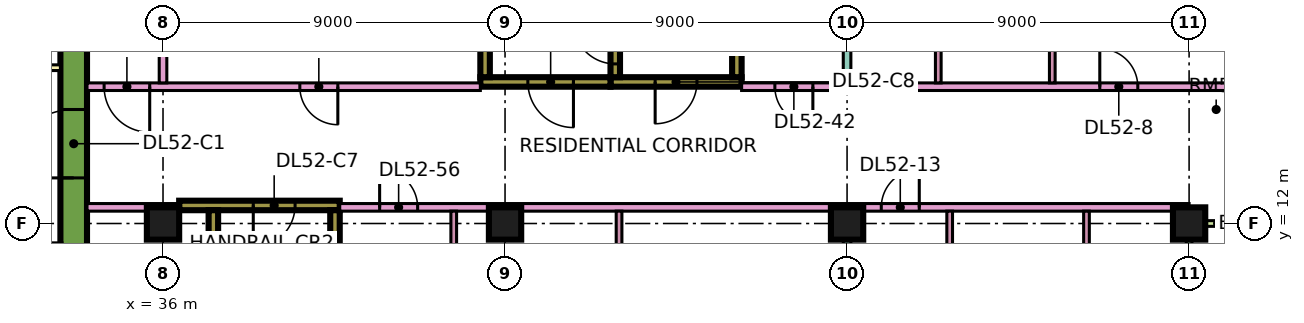
"""IFC4 building model, lengths in metres.
Left out: names, types, materials, properties, quantities, classifications, styles, units other than length and angle.
Written with IfcOpenShell. Run it as: python <this file> out.ifc"""

import sys

from ifc_helpers import new_model, si_unit, direction, frame, frame_2d, origin, origin_2d, place, context, subcontext, project, spatial, rectangle, extrude, element, fill, save


model = new_model("IFC4")
c1 = context("Model", 3, precision=1e-05, world=origin(), true_north=direction((0.0, 1.0)))
c2 = subcontext(c1, "Body", "Model", "MODEL_VIEW")
j1 = project(units=[si_unit("LENGTHUNIT", "METRE"), si_unit("PLANEANGLEUNIT", "RADIAN")], contexts=[c1])
p1 = place(None, origin())
s1 = spatial("IfcSite", under=j1, at=p1, CompositionType="ELEMENT")
p2 = place(p1, origin())
s2 = spatial("IfcBuilding", under=s1, at=p2, CompositionType="ELEMENT")
p3 = place(p2, frame((0.0, 0.0, 222.9)))
s3 = spatial("IfcBuildingStorey", under=s2, at=p3, CompositionType="ELEMENT", Elevation=222.9)
for number, where, z_axis, x_axis in (
    (1, (36.0, 12.0, 0.0), (0.0, 0.0, 1.0), (1.0, 0.0, 0.0)),
    (2, (45.0, 12.0, 0.0), (0.0, 0.0, 1.0), (1.0, 0.0, 0.0)),
    (3, (54.0, 12.0, 0.0), (0.0, 0.0, 1.0), (1.0, 0.0, 0.0)),
    (4, (63.0, 12.0, 0.0), (0.0, 0.0, 1.0), (1.0, 0.0, 0.0)),
):
    element("IfcColumn", number, at=place(p3, frame(where, z_axis=z_axis, x_axis=x_axis)), inside=s3, PredefinedType="COLUMN", context=c2, shape_type="SweptSolid", body=[
        extrude(rectangle(XDim=0.85, YDim=0.85, at=origin_2d()), origin(), (0.0, 0.0, 1.0), 3.75),
    ])
p4 = place(p3, frame((33.65, 7.7, 0.0), z_axis=(0.0, 0.0, 1.0), x_axis=(0.0, 1.0, 0.0)))
e5 = element("IfcWall", 5, at=p4, inside=s3, PredefinedType="SHEAR", context=c2, shape_type="SweptSolid", body=[
    extrude(rectangle(XDim=11.6, YDim=0.7, at=frame_2d((5.8, 0.0))), origin(), (0.0, 0.0, 1.0), 3.75),
])
p5 = place(p4, frame((5.5, 0.0, 0.0)))
e6 = element("IfcOpeningElement", 6, at=p5, cuts=e5, PredefinedType="OPENING", context=c2, shape_type="SweptSolid", body=[
    extrude(rectangle(XDim=1.8, YDim=2.4, at=frame_2d((0.9, 1.2))), frame((0.0, 0.36, 0.0), z_axis=(0.0, -1.0, 0.0), x_axis=(1.0, 0.0, 0.0)), (0.0, 0.0, 1.0), 0.72),
])
p6 = place(p3, frame((36.425, 12.475, 0.0), z_axis=(0.0, 0.0, 1.0), x_axis=(1.0, 0.0, 0.0)))
e7 = element("IfcWall", 7, at=p6, inside=s3, PredefinedType="SHEAR", context=c2, shape_type="SweptSolid", body=[
    extrude(rectangle(XDim=4.225, YDim=0.25, at=frame_2d((2.112, 0.0))), origin(), (0.0, 0.0, 1.0), 3.75),
])
p7 = place(p6, frame((1.95, 0.0, 0.0)))
e8 = element("IfcOpeningElement", 8, at=p7, cuts=e7, PredefinedType="OPENING", context=c2, shape_type="SweptSolid", body=[
    extrude(rectangle(XDim=1.1, YDim=2.2, at=frame_2d((0.55, 1.1))), frame((0.0, 0.135, 0.0), z_axis=(0.0, -1.0, 0.0), x_axis=(1.0, 0.0, 0.0)), (0.0, 0.0, 1.0), 0.27),
])
for number, where, z_axis, x_axis in (
    (9, (37.325, 5.85, 0.0), (0.0, 0.0, 1.0), (0.0, 1.0, 0.0)),
    (10, (40.525, 5.85, 0.0), (0.0, 0.0, 1.0), (0.0, 1.0, 0.0)),
):
    element("IfcWall", number, at=place(p3, frame(where, z_axis=z_axis, x_axis=x_axis)), inside=s3, PredefinedType="SHEAR", context=c2, shape_type="SweptSolid", body=[
        extrude(rectangle(XDim=6.5, YDim=0.25, at=frame_2d((3.25, 0.0))), origin(), (0.0, 0.0, 1.0), 3.75),
    ])
p8 = place(p3, frame((47.775, 15.725, 0.0), z_axis=(0.0, 0.0, 1.0), x_axis=(1.0, 0.0, 0.0)))
e11 = element("IfcWall", 11, at=p8, inside=s3, PredefinedType="SHEAR", context=c2, shape_type="SweptSolid", body=[
    extrude(rectangle(XDim=3.45, YDim=0.25, at=frame_2d((1.725, 0.0))), origin(), (0.0, 0.0, 1.0), 3.75),
])
p9 = place(p8, frame((1.175, 0.0, 0.0)))
e12 = element("IfcOpeningElement", 12, at=p9, cuts=e11, PredefinedType="OPENING", context=c2, shape_type="SweptSolid", body=[
    extrude(rectangle(XDim=1.1, YDim=2.2, at=frame_2d((0.55, 1.1))), frame((0.0, 0.135, 0.0), z_axis=(0.0, -1.0, 0.0), x_axis=(1.0, 0.0, 0.0)), (0.0, 0.0, 1.0), 0.27),
])
p10 = place(p3, frame((47.9, 15.85, 0.0), z_axis=(0.0, 0.0, 1.0), x_axis=(0.0, 1.0, 0.0)))
e13 = element("IfcWall", 13, at=p10, inside=s3, PredefinedType="SHEAR", context=c2, shape_type="SweptSolid", body=[
    extrude(rectangle(XDim=6.5, YDim=0.25, at=frame_2d((3.25, 0.0))), origin(), (0.0, 0.0, 1.0), 3.75),
])
p11 = place(p10, frame((0.35, 0.0, 0.0)))
e14 = element("IfcOpeningElement", 14, at=p11, cuts=e13, PredefinedType="OPENING", context=c2, shape_type="SweptSolid", body=[
    extrude(rectangle(XDim=1.1, YDim=2.2, at=frame_2d((0.55, 1.1))), frame((0.0, 0.135, 0.0), z_axis=(0.0, -1.0, 0.0), x_axis=(1.0, 0.0, 0.0)), (0.0, 0.0, 1.0), 0.27),
])
p12 = place(p3, frame((51.1, 15.85, 0.0), z_axis=(0.0, 0.0, 1.0), x_axis=(0.0, 1.0, 0.0)))
e15 = element("IfcWall", 15, at=p12, inside=s3, PredefinedType="SHEAR", context=c2, shape_type="SweptSolid", body=[
    extrude(rectangle(XDim=6.5, YDim=0.25, at=frame_2d((3.25, 0.0))), origin(), (0.0, 0.0, 1.0), 3.75),
])
p13 = place(p3, frame((44.35, 15.725, 0.0), z_axis=(0.0, 0.0, 1.0), x_axis=(1.0, 0.0, 0.0)))
e16 = element("IfcWall", 16, at=p13, inside=s3, PredefinedType="SHEAR", context=c2, shape_type="SweptSolid", body=[
    extrude(rectangle(XDim=3.425, YDim=0.25, at=frame_2d((1.712, 0.0))), origin(), (0.0, 0.0, 1.0), 3.75),
])
p14 = place(p13, frame((1.25, 0.0, 0.0)))
e17 = element("IfcOpeningElement", 17, at=p14, cuts=e16, PredefinedType="OPENING", context=c2, shape_type="SweptSolid", body=[
    extrude(rectangle(XDim=1.2, YDim=2.2, at=frame_2d((0.6, 1.1))), frame((0.0, 0.135, 0.0), z_axis=(0.0, -1.0, 0.0), x_axis=(1.0, 0.0, 0.0)), (0.0, 0.0, 1.0), 0.27),
])
p15 = place(p3, frame((44.475, 15.85, 0.0), z_axis=(0.0, 0.0, 1.0), x_axis=(0.0, 1.0, 0.0)))
e18 = element("IfcWall", 18, at=p15, inside=s3, PredefinedType="SHEAR", context=c2, shape_type="SweptSolid", body=[
    extrude(rectangle(XDim=6.5, YDim=0.25, at=frame_2d((3.25, 0.0))), origin(), (0.0, 0.0, 1.0), 3.75),
])
p16 = place(p15, frame((1.75, 0.0, 0.0)))
e19 = element("IfcOpeningElement", 19, at=p16, cuts=e18, PredefinedType="OPENING", context=c2, shape_type="SweptSolid", body=[
    extrude(rectangle(XDim=1.1, YDim=2.2, at=frame_2d((0.55, 1.1))), frame((0.0, 0.135, 0.0), z_axis=(0.0, -1.0, 0.0), x_axis=(1.0, 0.0, 0.0)), (0.0, 0.0, 1.0), 0.27),
])
p17 = place(p15, frame((4.3, 0.0, 0.0)))
e20 = element("IfcOpeningElement", 20, at=p17, cuts=e18, PredefinedType="OPENING", context=c2, shape_type="SweptSolid", body=[
    extrude(rectangle(XDim=1.1, YDim=2.2, at=frame_2d((0.55, 1.1))), frame((0.0, 0.135, 0.0), z_axis=(0.0, -1.0, 0.0), x_axis=(1.0, 0.0, 0.0)), (0.0, 0.0, 1.0), 0.27),
])
p18 = place(p3, frame((63.0, 1.575, 0.0), z_axis=(0.0, 0.0, 1.0), x_axis=(0.0, 1.0, 0.0)))
e21 = element("IfcWall", 21, at=p18, inside=s3, PredefinedType="SOLIDWALL", context=c2, shape_type="SweptSolid", body=[
    extrude(rectangle(XDim=10.35, YDim=0.15, at=frame_2d((5.175, 0.0))), origin(), (0.0, 0.0, 1.0), 3.35),
])
p19 = place(p18, frame((1.825, 0.0, 0.0)))
e22 = element("IfcOpeningElement", 22, at=p19, cuts=e21, PredefinedType="OPENING", context=c2, shape_type="SweptSolid", body=[
    extrude(rectangle(XDim=1.8, YDim=2.4, at=frame_2d((0.9, 1.2))), frame((0.0, 0.085, 0.0), z_axis=(0.0, -1.0, 0.0), x_axis=(1.0, 0.0, 0.0)), (0.0, 0.0, 1.0), 0.17),
])
p20 = place(p18, frame((7.075, 0.0, 0.45)))
e23 = element("IfcOpeningElement", 23, at=p20, cuts=e21, PredefinedType="OPENING", context=c2, shape_type="SweptSolid", body=[
    extrude(rectangle(XDim=2.4, YDim=2.4, at=frame_2d((1.2, 1.2))), frame((0.0, 0.085, 0.0), z_axis=(0.0, -1.0, 0.0), x_axis=(1.0, 0.0, 0.0)), (0.0, 0.0, 1.0), 0.17),
])
p21 = place(p3, frame((64.5, 12.0, 0.0), z_axis=(0.0, 0.0, 1.0), x_axis=(-1.0, 0.0, 0.0)))
e24 = element("IfcWall", 24, at=p21, inside=s3, PredefinedType="SOLIDWALL", context=c2, shape_type="SweptSolid", body=[
    extrude(rectangle(XDim=1.5, YDim=0.15, at=frame_2d((0.75, 0.0))), origin(), (0.0, 0.0, 1.0), 3.35),
])
p22 = place(p3, frame((31.3, 16.1, 0.0), z_axis=(0.0, 0.0, 1.0), x_axis=(1.0, 0.0, 0.0)))
e25 = element("IfcWall", 25, at=p22, inside=s3, PredefinedType="PARTITIONING", context=c2, shape_type="SweptSolid", body=[
    extrude(rectangle(XDim=2.0, YDim=0.15, at=frame_2d((1.0, 0.0))), origin(), (0.0, 0.0, 1.0), 3.35),
])
p23 = place(p3, frame((34.0, 12.425, 0.0), z_axis=(0.0, 0.0, 1.0), x_axis=(1.0, 0.0, 0.0)))
e26 = element("IfcWall", 26, at=p23, inside=s3, PredefinedType="PARTITIONING", context=c2, shape_type="SweptSolid", body=[
    extrude(rectangle(XDim=2.426, YDim=0.2, at=frame_2d((1.213, 0.0))), origin(), (0.0, 0.0, 1.0), 3.35),
])
p24 = place(p3, frame((34.0, 15.6, 0.0), z_axis=(0.0, 0.0, 1.0), x_axis=(1.0, 0.0, 0.0)))
e27 = element("IfcWall", 27, at=p24, inside=s3, PredefinedType="PARTITIONING", context=c2, shape_type="SweptSolid", body=[
    extrude(rectangle(XDim=10.35, YDim=0.2, at=frame_2d((5.175, 0.0))), origin(), (0.0, 0.0, 1.0), 3.35),
])
p25 = place(p24, frame((5.6, 0.0, 0.0)))
e28 = element("IfcOpeningElement", 28, at=p25, cuts=e27, PredefinedType="OPENING", context=c2, shape_type="SweptSolid", body=[
    extrude(rectangle(XDim=1.0, YDim=2.1, at=frame_2d((0.5, 1.05))), frame((0.0, 0.11, 0.0), z_axis=(0.0, -1.0, 0.0), x_axis=(1.0, 0.0, 0.0)), (0.0, 0.0, 1.0), 0.22),
])
p26 = place(p24, frame((0.45, 0.0, 0.0)))
e29 = element("IfcOpeningElement", 29, at=p26, cuts=e27, PredefinedType="OPENING", context=c2, shape_type="SweptSolid", body=[
    extrude(rectangle(XDim=1.2, YDim=2.1, at=frame_2d((0.6, 1.05))), frame((0.0, 0.11, 0.0), z_axis=(0.0, -1.0, 0.0), x_axis=(1.0, 0.0, 0.0)), (0.0, 0.0, 1.0), 0.22),
])
p27 = place(p3, frame((36.0, 15.7, 0.0), z_axis=(0.0, 0.0, 1.0), x_axis=(0.0, 1.0, 0.0)))
e30 = element("IfcWall", 30, at=p27, inside=s3, PredefinedType="PARTITIONING", context=c2, shape_type="SweptSolid", body=[
    extrude(rectangle(XDim=8.3, YDim=0.2, at=frame_2d((4.15, 0.0))), origin(), (0.0, 0.0, 1.0), 3.35),
])
p28 = place(p3, frame((40.65, 12.425, 0.0), z_axis=(0.0, 0.0, 1.0), x_axis=(1.0, 0.0, 0.0)))
e31 = element("IfcWall", 31, at=p28, inside=s3, PredefinedType="PARTITIONING", context=c2, shape_type="SweptSolid", body=[
    extrude(rectangle(XDim=22.35, YDim=0.2, at=frame_2d((11.175, 0.0))), origin(), (0.0, 0.0, 1.0), 3.35),
])
p29 = place(p28, frame((14.25, 0.0, 0.0)))
e32 = element("IfcOpeningElement", 32, at=p29, cuts=e31, PredefinedType="OPENING", context=c2, shape_type="SweptSolid", body=[
    extrude(rectangle(XDim=1.0, YDim=2.1, at=frame_2d((0.5, 1.05))), frame((0.0, 0.11, 0.0), z_axis=(0.0, -1.0, 0.0), x_axis=(1.0, 0.0, 0.0)), (0.0, 0.0, 1.0), 0.22),
])
p30 = place(p28, frame((1.05, 0.0, 0.0)))
e33 = element("IfcOpeningElement", 33, at=p30, cuts=e31, PredefinedType="OPENING", context=c2, shape_type="SweptSolid", body=[
    extrude(rectangle(XDim=1.0, YDim=2.1, at=frame_2d((0.5, 1.05))), frame((0.0, 0.11, 0.0), z_axis=(0.0, -1.0, 0.0), x_axis=(1.0, 0.0, 0.0)), (0.0, 0.0, 1.0), 0.22),
])
p31 = place(p3, frame((43.65, 5.975, 0.0), z_axis=(0.0, 0.0, 1.0), x_axis=(0.0, 1.0, 0.0)))
e34 = element("IfcWall", 34, at=p31, inside=s3, PredefinedType="PARTITIONING", context=c2, shape_type="SweptSolid", body=[
    extrude(rectangle(XDim=6.35, YDim=0.15, at=frame_2d((3.175, 0.0))), origin(), (0.0, 0.0, 1.0), 3.35),
])
p32 = place(p31, frame((4.275, 0.0, 0.0)))
e35 = element("IfcOpeningElement", 35, at=p32, cuts=e34, PredefinedType="OPENING", context=c2, shape_type="SweptSolid", body=[
    extrude(rectangle(XDim=0.9, YDim=2.1, at=frame_2d((0.45, 1.05))), frame((0.0, 0.085, 0.0), z_axis=(0.0, -1.0, 0.0), x_axis=(1.0, 0.0, 0.0)), (0.0, 0.0, 1.0), 0.17),
])
p33 = place(p3, frame((48.0, 5.975, 0.0), z_axis=(0.0, 0.0, 1.0), x_axis=(0.0, 1.0, 0.0)))
e36 = element("IfcWall", 36, at=p33, inside=s3, PredefinedType="PARTITIONING", context=c2, shape_type="SweptSolid", body=[
    extrude(rectangle(XDim=6.35, YDim=0.15, at=frame_2d((3.175, 0.0))), origin(), (0.0, 0.0, 1.0), 3.35),
])
p34 = place(p3, frame((51.225, 15.6, 0.0), z_axis=(0.0, 0.0, 1.0), x_axis=(1.0, 0.0, 0.0)))
e37 = element("IfcWall", 37, at=p34, inside=s3, PredefinedType="PARTITIONING", context=c2, shape_type="SweptSolid", body=[
    extrude(rectangle(XDim=13.125, YDim=0.2, at=frame_2d((6.562, 0.0))), origin(), (0.0, 0.0, 1.0), 3.35),
])
p35 = place(p34, frame((9.425, 0.0, 0.0)))
e38 = element("IfcOpeningElement", 38, at=p35, cuts=e37, PredefinedType="OPENING", context=c2, shape_type="SweptSolid", body=[
    extrude(rectangle(XDim=1.0, YDim=2.1, at=frame_2d((0.5, 1.05))), frame((0.0, 0.11, 0.0), z_axis=(0.0, -1.0, 0.0), x_axis=(1.0, 0.0, 0.0)), (0.0, 0.0, 1.0), 0.22),
])
p36 = place(p34, frame((0.875, 0.0, 0.0)))
e39 = element("IfcOpeningElement", 39, at=p36, cuts=e37, PredefinedType="OPENING", context=c2, shape_type="SweptSolid", body=[
    extrude(rectangle(XDim=1.0, YDim=2.1, at=frame_2d((0.5, 1.05))), frame((0.0, 0.11, 0.0), z_axis=(0.0, -1.0, 0.0), x_axis=(1.0, 0.0, 0.0)), (0.0, 0.0, 1.0), 0.22),
])
p37 = place(p3, frame((54.0, 0.074, 0.0), z_axis=(0.0, 0.0, 1.0), x_axis=(0.0, 1.0, 0.0)))
e40 = element("IfcWall", 40, at=p37, inside=s3, PredefinedType="PARTITIONING", context=c2, shape_type="SweptSolid", body=[
    extrude(rectangle(XDim=12.251, YDim=0.2, at=frame_2d((6.125, 0.0))), origin(), (0.0, 0.0, 1.0), 3.35),
])
p38 = place(p3, frame((54.0, 15.7, 0.0), z_axis=(0.0, 0.0, 1.0), x_axis=(0.0, 1.0, 0.0)))
e41 = element("IfcWall", 41, at=p38, inside=s3, PredefinedType="PARTITIONING", context=c2, shape_type="SweptSolid", body=[
    extrude(rectangle(XDim=8.226, YDim=0.2, at=frame_2d((4.113, 0.0))), origin(), (0.0, 0.0, 1.0), 3.35),
])
p39 = place(p3, frame((56.4, 15.7, 0.0), z_axis=(0.0, 0.0, 1.0), x_axis=(0.0, 1.0, 0.0)))
e42 = element("IfcWall", 42, at=p39, inside=s3, PredefinedType="PARTITIONING", context=c2, shape_type="SweptSolid", body=[
    extrude(rectangle(XDim=3.125, YDim=0.15, at=frame_2d((1.562, 0.0))), origin(), (0.0, 0.0, 1.0), 3.35),
])
p40 = place(p3, frame((56.7, 8.3, 0.0), z_axis=(0.0, 0.0, 1.0), x_axis=(0.0, 1.0, 0.0)))
e43 = element("IfcWall", 43, at=p40, inside=s3, PredefinedType="PARTITIONING", context=c2, shape_type="SweptSolid", body=[
    extrude(rectangle(XDim=4.025, YDim=0.15, at=frame_2d((2.012, 0.0))), origin(), (0.0, 0.0, 1.0), 3.35),
])
p41 = place(p3, frame((59.4, 15.7, 0.0), z_axis=(0.0, 0.0, 1.0), x_axis=(0.0, 1.0, 0.0)))
e44 = element("IfcWall", 44, at=p41, inside=s3, PredefinedType="PARTITIONING", context=c2, shape_type="SweptSolid", body=[
    extrude(rectangle(XDim=3.125, YDim=0.15, at=frame_2d((1.562, 0.0))), origin(), (0.0, 0.0, 1.0), 3.35),
])
p42 = place(p41, frame((1.2, 0.0, 0.0)))
e45 = element("IfcOpeningElement", 45, at=p42, cuts=e44, PredefinedType="OPENING", context=c2, shape_type="SweptSolid", body=[
    extrude(rectangle(XDim=0.8, YDim=2.1, at=frame_2d((0.4, 1.05))), frame((0.0, 0.085, 0.0), z_axis=(0.0, -1.0, 0.0), x_axis=(1.0, 0.0, 0.0)), (0.0, 0.0, 1.0), 0.17),
])
p43 = place(p3, frame((60.3, 8.3, 0.0), z_axis=(0.0, 0.0, 1.0), x_axis=(0.0, 1.0, 0.0)))
e46 = element("IfcWall", 46, at=p43, inside=s3, PredefinedType="PARTITIONING", context=c2, shape_type="SweptSolid", body=[
    extrude(rectangle(XDim=4.025, YDim=0.15, at=frame_2d((2.012, 0.0))), origin(), (0.0, 0.0, 1.0), 3.35),
])
p44 = place(p5, origin())
e47 = element("IfcDoor", 47, at=p44, inside=s3, OperationType="DOUBLE_DOOR_SINGLE_SWING", PredefinedType="DOOR", context=c2, shape_type="SweptSolid", body=[
    extrude(rectangle(XDim=1.8, YDim=2.4, at=frame_2d((0.9, 1.2))), frame((0.0, 0.025, 0.0), z_axis=(0.0, -1.0, 0.0), x_axis=(1.0, 0.0, 0.0)), (0.0, 0.0, 1.0), 0.05),
])
fill(e6, e47)
p45 = place(p7, frame((1.1, 0.0, 0.0), z_axis=(0.0, 0.0, 1.0), x_axis=(-1.0, 0.0, 0.0)))
e48 = element("IfcDoor", 48, at=p45, inside=s3, OperationType="SINGLE_SWING_LEFT", PredefinedType="DOOR", context=c2, shape_type="SweptSolid", body=[
    extrude(rectangle(XDim=1.1, YDim=2.2, at=frame_2d((0.55, 1.1))), frame((0.0, 0.025, 0.0), z_axis=(0.0, -1.0, 0.0), x_axis=(1.0, 0.0, 0.0)), (0.0, 0.0, 1.0), 0.05),
])
fill(e8, e48)
p46 = place(p9, frame((1.1, 0.0, 0.0), z_axis=(0.0, 0.0, 1.0), x_axis=(-1.0, 0.0, 0.0)))
e49 = element("IfcDoor", 49, at=p46, inside=s3, OperationType="SINGLE_SWING_LEFT", PredefinedType="DOOR", context=c2, shape_type="SweptSolid", body=[
    extrude(rectangle(XDim=1.1, YDim=2.2, at=frame_2d((0.55, 1.1))), frame((0.0, 0.025, 0.0), z_axis=(0.0, -1.0, 0.0), x_axis=(1.0, 0.0, 0.0)), (0.0, 0.0, 1.0), 0.05),
])
fill(e12, e49)
p47 = place(p14, origin())
e50 = element("IfcDoor", 50, at=p47, inside=s3, OperationType="SINGLE_SWING_RIGHT", PredefinedType="DOOR", context=c2, shape_type="SweptSolid", body=[
    extrude(rectangle(XDim=1.2, YDim=2.2, at=frame_2d((0.6, 1.1))), frame((0.0, 0.025, 0.0), z_axis=(0.0, -1.0, 0.0), x_axis=(1.0, 0.0, 0.0)), (0.0, 0.0, 1.0), 0.05),
])
fill(e17, e50)
p48 = place(p11, frame((1.1, 0.0, 0.0), z_axis=(0.0, 0.0, 1.0), x_axis=(-1.0, 0.0, 0.0)))
e51 = element("IfcDoor", 51, at=p48, inside=s3, OperationType="SINGLE_SWING_RIGHT", PredefinedType="DOOR", context=c2, shape_type="SweptSolid", body=[
    extrude(rectangle(XDim=1.1, YDim=2.2, at=frame_2d((0.55, 1.1))), frame((0.0, 0.025, 0.0), z_axis=(0.0, -1.0, 0.0), x_axis=(1.0, 0.0, 0.0)), (0.0, 0.0, 1.0), 0.05),
])
fill(e14, e51)
p49 = place(p25, origin())
e52 = element("IfcDoor", 52, at=p49, inside=s3, OperationType="SINGLE_SWING_RIGHT", PredefinedType="DOOR", context=c2, shape_type="SweptSolid", body=[
    extrude(rectangle(XDim=1.0, YDim=2.1, at=frame_2d((0.5, 1.05))), frame((0.0, 0.025, 0.0), z_axis=(0.0, -1.0, 0.0), x_axis=(1.0, 0.0, 0.0)), (0.0, 0.0, 1.0), 0.05),
])
fill(e28, e52)
p50 = place(p35, origin())
e53 = element("IfcDoor", 53, at=p50, inside=s3, OperationType="SINGLE_SWING_LEFT", PredefinedType="DOOR", context=c2, shape_type="SweptSolid", body=[
    extrude(rectangle(XDim=1.0, YDim=2.1, at=frame_2d((0.5, 1.05))), frame((0.0, 0.025, 0.0), z_axis=(0.0, -1.0, 0.0), x_axis=(1.0, 0.0, 0.0)), (0.0, 0.0, 1.0), 0.05),
])
fill(e38, e53)
p51 = place(p29, frame((1.0, 0.0, 0.0), z_axis=(0.0, 0.0, 1.0), x_axis=(-1.0, 0.0, 0.0)))
e54 = element("IfcDoor", 54, at=p51, inside=s3, OperationType="SINGLE_SWING_RIGHT", PredefinedType="DOOR", context=c2, shape_type="SweptSolid", body=[
    extrude(rectangle(XDim=1.0, YDim=2.1, at=frame_2d((0.5, 1.05))), frame((0.0, 0.025, 0.0), z_axis=(0.0, -1.0, 0.0), x_axis=(1.0, 0.0, 0.0)), (0.0, 0.0, 1.0), 0.05),
])
fill(e32, e54)
p52 = place(p26, origin())
e55 = element("IfcDoor", 55, at=p52, inside=s3, OperationType="SINGLE_SWING_RIGHT", PredefinedType="DOOR", context=c2, shape_type="SweptSolid", body=[
    extrude(rectangle(XDim=1.2, YDim=2.1, at=frame_2d((0.6, 1.05))), frame((0.0, 0.025, 0.0), z_axis=(0.0, -1.0, 0.0), x_axis=(1.0, 0.0, 0.0)), (0.0, 0.0, 1.0), 0.05),
])
fill(e29, e55)
p53 = place(p36, origin())
e56 = element("IfcDoor", 56, at=p53, inside=s3, OperationType="SINGLE_SWING_RIGHT", PredefinedType="DOOR", context=c2, shape_type="SweptSolid", body=[
    extrude(rectangle(XDim=1.0, YDim=2.1, at=frame_2d((0.5, 1.05))), frame((0.0, 0.025, 0.0), z_axis=(0.0, -1.0, 0.0), x_axis=(1.0, 0.0, 0.0)), (0.0, 0.0, 1.0), 0.05),
])
fill(e39, e56)
p54 = place(p30, origin())
e57 = element("IfcDoor", 57, at=p54, inside=s3, OperationType="SINGLE_SWING_LEFT", PredefinedType="DOOR", context=c2, shape_type="SweptSolid", body=[
    extrude(rectangle(XDim=1.0, YDim=2.1, at=frame_2d((0.5, 1.05))), frame((0.0, 0.025, 0.0), z_axis=(0.0, -1.0, 0.0), x_axis=(1.0, 0.0, 0.0)), (0.0, 0.0, 1.0), 0.05),
])
fill(e33, e57)
save(model, sys.argv[1])
